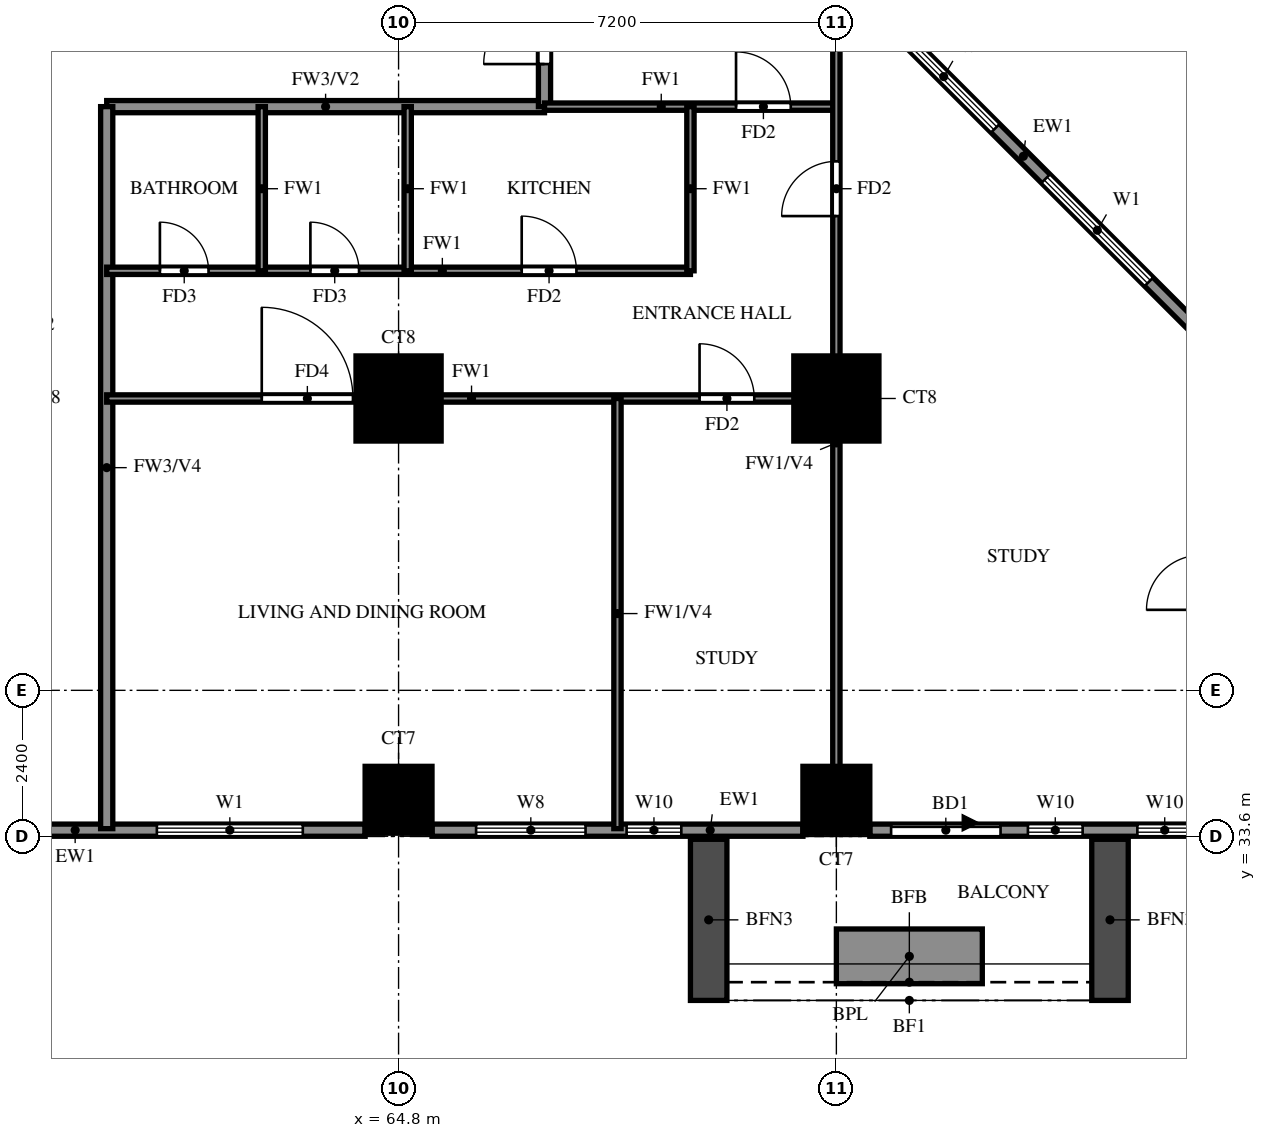
"""IFC4 building model, lengths in metres.
Left out: names, types, materials, properties, quantities, classifications, styles, units other than length and angle.
Written with IfcOpenShell. Run it as: python <this file> out.ifc"""

import sys

from ifc_helpers import new_model, si_unit, direction, frame, frame_2d, origin, origin_2d, place, context, subcontext, project, spatial, rectangle, extrude, source, transform, mapped, element, fill, save


model = new_model("IFC4")
c1 = context("Model", 3, precision=1e-05, world=origin(), true_north=direction((0.0, 1.0)))
c2 = subcontext(c1, "Body", "Model", "MODEL_VIEW")
j1 = project(units=[si_unit("LENGTHUNIT", "METRE"), si_unit("PLANEANGLEUNIT", "RADIAN")], contexts=[c1])
p1 = place(None, origin())
s1 = spatial("IfcSite", under=j1, at=p1, CompositionType="ELEMENT")
p2 = place(p1, origin())
s2 = spatial("IfcBuilding", under=s1, at=p2, CompositionType="ELEMENT")
p3 = place(p2, frame((0.0, 0.0, 51.5)))
s3 = spatial("IfcBuildingStorey", under=s2, at=p3, CompositionType="ELEMENT", Elevation=51.5)
m1 = source(origin(), c2, "Body", "SweptSolid", [
    extrude(rectangle(XDim=1.1, YDim=1.1, at=origin_2d()), origin(), (0.0, 0.0, 1.0), 3.18),
])
for number, where, z_axis, x_axis in (
    (1, (64.8, 34.2, 0.0), (0.0, 0.0, 1.0), (1.0, 0.0, 0.0)),
    (2, (72.0, 34.2, 0.0), (0.0, 0.0, 1.0), (1.0, 0.0, 0.0)),
):
    element("IfcColumn", number, at=place(p3, frame(where, z_axis=z_axis, x_axis=x_axis)), inside=s3, PredefinedType="COLUMN", context=c2, shape_type="MappedRepresentation", body=[
        mapped(m1, transform((0.0, 0.0, 0.0))),
    ])
m2 = source(origin(), c2, "Body", "SweptSolid", [
    extrude(rectangle(XDim=1.4, YDim=1.4, at=origin_2d()), origin(), (0.0, 0.0, 1.0), 3.18),
])
for number, where, z_axis, x_axis in (
    (3, (64.8, 40.8, 0.0), (0.0, 0.0, 1.0), (1.0, 0.0, 0.0)),
    (4, (72.0, 40.8, 0.0), (0.0, 0.0, 1.0), (1.0, 0.0, 0.0)),
):
    element("IfcColumn", number, at=place(p3, frame(where, z_axis=z_axis, x_axis=x_axis)), inside=s3, PredefinedType="COLUMN", context=c2, shape_type="MappedRepresentation", body=[
        mapped(m2, transform((0.0, 0.0, 0.0))),
    ])
p4 = place(p3, frame((78.74, 41.118, 0.0), z_axis=(0.0, 0.0, 1.0), x_axis=(-0.707106781187, 0.707106781187, 0.0)))
e5 = element("IfcWall", 5, at=p4, inside=s3, PredefinedType="SOLIDWALL", context=c2, shape_type="SweptSolid", body=[
    extrude(rectangle(XDim=9.874, YDim=0.2, at=frame_2d((4.937, 0.0))), origin(), (0.0, 0.0, 1.0), 3.18),
])
p5 = place(p4, frame((2.264, 0.0, 0.6)))
e6 = element("IfcOpeningElement", 6, at=p5, cuts=e5, PredefinedType="OPENING", context=c2, shape_type="SweptSolid", body=[
    extrude(rectangle(XDim=2.4, YDim=2.4, at=frame_2d((1.2, 1.2))), frame((0.0, 0.11, 0.0), z_axis=(0.0, -1.0, 0.0), x_axis=(1.0, 0.0, 0.0)), (0.0, 0.0, 1.0), 0.22),
])
p6 = place(p4, frame((5.836, 0.0, 0.6)))
e7 = element("IfcOpeningElement", 7, at=p6, cuts=e5, PredefinedType="OPENING", context=c2, shape_type="SweptSolid", body=[
    extrude(rectangle(XDim=2.4, YDim=2.4, at=frame_2d((1.2, 1.2))), frame((0.0, 0.11, 0.0), z_axis=(0.0, -1.0, 0.0), x_axis=(1.0, 0.0, 0.0)), (0.0, 0.0, 1.0), 0.22),
])
p7 = place(p3, frame((58.8, 33.7, 0.0), z_axis=(0.0, 0.0, 1.0), x_axis=(1.0, 0.0, 0.0)))
e8 = element("IfcWall", 8, at=p7, inside=s3, PredefinedType="SOLIDWALL", context=c2, shape_type="SweptSolid", body=[
    extrude(rectangle(XDim=5.45, YDim=0.2, at=frame_2d((2.725, 0.0))), origin(), (0.0, 0.0, 1.0), 3.18),
])
p8 = place(p7, frame((2.025, 0.0, 0.6)))
e9 = element("IfcOpeningElement", 9, at=p8, cuts=e8, PredefinedType="OPENING", context=c2, shape_type="SweptSolid", body=[
    extrude(rectangle(XDim=2.4, YDim=2.4, at=frame_2d((1.2, 1.2))), frame((0.0, 0.11, 0.0), z_axis=(0.0, -1.0, 0.0), x_axis=(1.0, 0.0, 0.0)), (0.0, 0.0, 1.0), 0.22),
])
p9 = place(p3, frame((65.35, 33.7, 0.0), z_axis=(0.0, 0.0, 1.0), x_axis=(1.0, 0.0, 0.0)))
e10 = element("IfcWall", 10, at=p9, inside=s3, PredefinedType="SOLIDWALL", context=c2, shape_type="SweptSolid", body=[
    extrude(rectangle(XDim=6.1, YDim=0.2, at=frame_2d((3.05, 0.0))), origin(), (0.0, 0.0, 1.0), 3.18),
])
p10 = place(p9, frame((3.2, 0.0, 0.6)))
e11 = element("IfcOpeningElement", 11, at=p10, cuts=e10, PredefinedType="OPENING", context=c2, shape_type="SweptSolid", body=[
    extrude(rectangle(XDim=0.9, YDim=2.4, at=frame_2d((0.45, 1.2))), frame((0.0, 0.11, 0.0), z_axis=(0.0, -1.0, 0.0), x_axis=(1.0, 0.0, 0.0)), (0.0, 0.0, 1.0), 0.22),
])
p11 = place(p9, frame((0.725, 0.0, 0.6)))
e12 = element("IfcOpeningElement", 12, at=p11, cuts=e10, PredefinedType="OPENING", context=c2, shape_type="SweptSolid", body=[
    extrude(rectangle(XDim=1.8, YDim=2.4, at=frame_2d((0.9, 1.2))), frame((0.0, 0.11, 0.0), z_axis=(0.0, -1.0, 0.0), x_axis=(1.0, 0.0, 0.0)), (0.0, 0.0, 1.0), 0.22),
])
p12 = place(p3, frame((72.55, 33.7, 0.0), z_axis=(0.0, 0.0, 1.0), x_axis=(1.0, 0.0, 0.0)))
e13 = element("IfcWall", 13, at=p12, inside=s3, PredefinedType="SOLIDWALL", context=c2, shape_type="SweptSolid", body=[
    extrude(rectangle(XDim=13.609, YDim=0.2, at=frame_2d((6.804, 0.0))), origin(), (0.0, 0.0, 1.0), 3.18),
])
p13 = place(p12, frame((0.35, 0.0, 0.0)))
e14 = element("IfcOpeningElement", 14, at=p13, cuts=e13, PredefinedType="OPENING", context=c2, shape_type="SweptSolid", body=[
    extrude(rectangle(XDim=1.8, YDim=2.4, at=frame_2d((0.9, 1.2))), frame((0.0, 0.11, 0.0), z_axis=(0.0, -1.0, 0.0), x_axis=(1.0, 0.0, 0.0)), (0.0, 0.0, 1.0), 0.22),
])
p14 = place(p12, frame((2.6, 0.0, 0.6)))
e15 = element("IfcOpeningElement", 15, at=p14, cuts=e13, PredefinedType="OPENING", context=c2, shape_type="SweptSolid", body=[
    extrude(rectangle(XDim=0.9, YDim=2.4, at=frame_2d((0.45, 1.2))), frame((0.0, 0.11, 0.0), z_axis=(0.0, -1.0, 0.0), x_axis=(1.0, 0.0, 0.0)), (0.0, 0.0, 1.0), 0.22),
])
p15 = place(p12, frame((4.4, 0.0, 0.6)))
e16 = element("IfcOpeningElement", 16, at=p15, cuts=e13, PredefinedType="OPENING", context=c2, shape_type="SweptSolid", body=[
    extrude(rectangle(XDim=0.9, YDim=2.4, at=frame_2d((0.45, 1.2))), frame((0.0, 0.11, 0.0), z_axis=(0.0, -1.0, 0.0), x_axis=(1.0, 0.0, 0.0)), (0.0, 0.0, 1.0), 0.22),
])
p16 = place(p12, frame((6.536, 0.0, 0.6)))
e17 = element("IfcOpeningElement", 17, at=p16, cuts=e13, PredefinedType="OPENING", context=c2, shape_type="SweptSolid", body=[
    extrude(rectangle(XDim=2.4, YDim=2.4, at=frame_2d((1.2, 1.2))), frame((0.0, 0.11, 0.0), z_axis=(0.0, -1.0, 0.0), x_axis=(1.0, 0.0, 0.0)), (0.0, 0.0, 1.0), 0.22),
])
p17 = place(p12, frame((9.922, 0.0, 0.6)))
e18 = element("IfcOpeningElement", 18, at=p17, cuts=e13, PredefinedType="OPENING", context=c2, shape_type="SweptSolid", body=[
    extrude(rectangle(XDim=2.4, YDim=2.4, at=frame_2d((1.2, 1.2))), frame((0.0, 0.11, 0.0), z_axis=(0.0, -1.0, 0.0), x_axis=(1.0, 0.0, 0.0)), (0.0, 0.0, 1.0), 0.22),
])
for number, where, z_axis, x_axis in (
    (19, (69.9, 33.55, 0.0), (0.0, 0.0, 1.0), (0.0, -1.0, 0.0)),
    (20, (76.5, 33.55, 0.0), (0.0, 0.0, 1.0), (0.0, -1.0, 0.0)),
):
    element("IfcWall", number, at=place(p3, frame(where, z_axis=z_axis, x_axis=x_axis)), inside=s3, PredefinedType="SOLIDWALL", context=c2, shape_type="SweptSolid", body=[
        extrude(rectangle(XDim=2.65, YDim=0.6, at=frame_2d((1.325, 0.0))), origin(), (0.0, 0.0, 1.0), 2.85),
    ])
p18 = place(p3, frame((72.0, 31.625, 0.0), z_axis=(0.0, 0.0, 1.0), x_axis=(1.0, 0.0, 0.0)))
e21 = element("IfcWall", 21, at=p18, inside=s3, PredefinedType="SOLIDWALL", context=c2, shape_type="SweptSolid", body=[
    extrude(rectangle(XDim=2.4, YDim=0.9, at=frame_2d((1.2, 0.0))), origin(), (0.0, 0.0, 1.0), 0.9),
])
p19 = place(p3, frame((60.0, 45.6, 0.0), z_axis=(0.0, 0.0, 1.0), x_axis=(1.0, 0.0, 0.0)))
e22 = element("IfcWall", 22, at=p19, inside=s3, PredefinedType="SOLIDWALL", context=c2, shape_type="SweptSolid", body=[
    extrude(rectangle(XDim=7.2, YDim=0.2, at=frame_2d((3.6, 0.0))), origin(), (0.0, 0.0, 1.0), 3.18),
])
p20 = place(p3, frame((60.0, 33.725, 0.0), z_axis=(0.0, 0.0, 1.0), x_axis=(0.0, 1.0, 0.0)))
e23 = element("IfcWall", 23, at=p20, inside=s3, PredefinedType="SOLIDWALL", context=c2, shape_type="SweptSolid", body=[
    extrude(rectangle(XDim=11.875, YDim=0.2, at=frame_2d((5.938, 0.0))), origin(), (0.0, 0.0, 1.0), 2.28),
])
p21 = place(p3, frame((67.2, 45.6, 0.0), z_axis=(0.0, 0.0, 1.0), x_axis=(0.0, 1.0, 0.0)))
e24 = element("IfcWall", 24, at=p21, inside=s3, PredefinedType="SOLIDWALL", context=c2, shape_type="SweptSolid", body=[
    extrude(rectangle(XDim=8.4, YDim=0.2, at=frame_2d((4.2, 0.0))), origin(), (0.0, 0.0, 1.0), 3.18),
])
p22 = place(p21, frame((0.7, 0.0, 0.0)))
e25 = element("IfcOpeningElement", 25, at=p22, cuts=e24, PredefinedType="OPENING", context=c2, shape_type="SweptSolid", body=[
    extrude(rectangle(XDim=1.0, YDim=2.1, at=frame_2d((0.5, 1.05))), frame((0.0, 0.11, 0.0), z_axis=(0.0, -1.0, 0.0), x_axis=(1.0, 0.0, 0.0)), (0.0, 0.0, 1.0), 0.22),
])
p23 = place(p3, frame((60.0, 40.8, 0.0), z_axis=(0.0, 0.0, 1.0), x_axis=(1.0, 0.0, 0.0)))
e26 = element("IfcWall", 26, at=p23, inside=s3, PredefinedType="PARTITIONING", context=c2, shape_type="SweptSolid", body=[
    extrude(rectangle(XDim=12.0, YDim=0.12, at=frame_2d((6.0, 0.0))), origin(), (0.0, 0.0, 1.0), 3.18),
])
p24 = place(p23, frame((9.75, 0.0, 0.0)))
e27 = element("IfcOpeningElement", 27, at=p24, cuts=e26, PredefinedType="OPENING", context=c2, shape_type="SweptSolid", body=[
    extrude(rectangle(XDim=0.9, YDim=2.1, at=frame_2d((0.45, 1.05))), frame((0.0, 0.07, 0.0), z_axis=(0.0, -1.0, 0.0), x_axis=(1.0, 0.0, 0.0)), (0.0, 0.0, 1.0), 0.14),
])
p25 = place(p23, frame((2.55, 0.0, 0.0)))
e28 = element("IfcOpeningElement", 28, at=p25, cuts=e26, PredefinedType="OPENING", context=c2, shape_type="SweptSolid", body=[
    extrude(rectangle(XDim=1.5, YDim=2.1, at=frame_2d((0.75, 1.05))), frame((0.0, 0.07, 0.0), z_axis=(0.0, -1.0, 0.0), x_axis=(1.0, 0.0, 0.0)), (0.0, 0.0, 1.0), 0.14),
])
p26 = place(p3, frame((60.0, 42.9, 0.0), z_axis=(0.0, 0.0, 1.0), x_axis=(1.0, 0.0, 0.0)))
e29 = element("IfcWall", 29, at=p26, inside=s3, PredefinedType="PARTITIONING", context=c2, shape_type="SweptSolid", body=[
    extrude(rectangle(XDim=9.6, YDim=0.12, at=frame_2d((4.8, 0.0))), origin(), (0.0, 0.0, 1.0), 3.18),
])
p27 = place(p26, frame((6.825, 0.0, 0.0)))
e30 = element("IfcOpeningElement", 30, at=p27, cuts=e29, PredefinedType="OPENING", context=c2, shape_type="SweptSolid", body=[
    extrude(rectangle(XDim=0.9, YDim=2.1, at=frame_2d((0.45, 1.05))), frame((0.0, 0.07, 0.0), z_axis=(0.0, -1.0, 0.0), x_axis=(1.0, 0.0, 0.0)), (0.0, 0.0, 1.0), 0.14),
])
p28 = place(p26, frame((3.35, 0.0, 0.0)))
e31 = element("IfcOpeningElement", 31, at=p28, cuts=e29, PredefinedType="OPENING", context=c2, shape_type="SweptSolid", body=[
    extrude(rectangle(XDim=0.8, YDim=2.1, at=frame_2d((0.4, 1.05))), frame((0.0, 0.07, 0.0), z_axis=(0.0, -1.0, 0.0), x_axis=(1.0, 0.0, 0.0)), (0.0, 0.0, 1.0), 0.14),
])
p29 = place(p26, frame((0.875, 0.0, 0.0)))
e32 = element("IfcOpeningElement", 32, at=p29, cuts=e29, PredefinedType="OPENING", context=c2, shape_type="SweptSolid", body=[
    extrude(rectangle(XDim=0.8, YDim=2.1, at=frame_2d((0.4, 1.05))), frame((0.0, 0.07, 0.0), z_axis=(0.0, -1.0, 0.0), x_axis=(1.0, 0.0, 0.0)), (0.0, 0.0, 1.0), 0.14),
])
p30 = place(p3, frame((67.2, 45.6, 0.0), z_axis=(0.0, 0.0, 1.0), x_axis=(1.0, 0.0, 0.0)))
e33 = element("IfcWall", 33, at=p30, inside=s3, PredefinedType="PARTITIONING", context=c2, shape_type="SweptSolid", body=[
    extrude(rectangle(XDim=4.8, YDim=0.12, at=frame_2d((2.4, 0.0))), origin(), (0.0, 0.0, 1.0), 3.18),
])
p31 = place(p30, frame((3.15, 0.0, 0.0)))
e34 = element("IfcOpeningElement", 34, at=p31, cuts=e33, PredefinedType="OPENING", context=c2, shape_type="SweptSolid", body=[
    extrude(rectangle(XDim=0.9, YDim=2.1, at=frame_2d((0.45, 1.05))), frame((0.0, 0.07, 0.0), z_axis=(0.0, -1.0, 0.0), x_axis=(1.0, 0.0, 0.0)), (0.0, 0.0, 1.0), 0.14),
])
for number, where, z_axis, x_axis in (
    (35, (62.55, 42.9, 0.0), (0.0, 0.0, 1.0), (0.0, 1.0, 0.0)),
    (36, (64.95, 42.9, 0.0), (0.0, 0.0, 1.0), (0.0, 1.0, 0.0)),
):
    element("IfcWall", number, at=place(p3, frame(where, z_axis=z_axis, x_axis=x_axis)), inside=s3, PredefinedType="PARTITIONING", context=c2, shape_type="SweptSolid", body=[
        extrude(rectangle(XDim=2.7, YDim=0.12, at=frame_2d((1.35, 0.0))), origin(), (0.0, 0.0, 1.0), 3.18),
    ])
p32 = place(p3, frame((68.4, 33.725, 0.0), z_axis=(0.0, 0.0, 1.0), x_axis=(0.0, 1.0, 0.0)))
e37 = element("IfcWall", 37, at=p32, inside=s3, PredefinedType="PARTITIONING", context=c2, shape_type="SweptSolid", body=[
    extrude(rectangle(XDim=7.075, YDim=0.12, at=frame_2d((3.538, 0.0))), origin(), (0.0, 0.0, 1.0), 2.28),
])
p33 = place(p3, frame((69.6, 42.9, 0.0), z_axis=(0.0, 0.0, 1.0), x_axis=(0.0, 1.0, 0.0)))
e38 = element("IfcWall", 38, at=p33, inside=s3, PredefinedType="PARTITIONING", context=c2, shape_type="SweptSolid", body=[
    extrude(rectangle(XDim=2.7, YDim=0.12, at=frame_2d((1.35, 0.0))), origin(), (0.0, 0.0, 1.0), 3.18),
])
p34 = place(p3, frame((72.0, 33.725, 0.0), z_axis=(0.0, 0.0, 1.0), x_axis=(0.0, 1.0, 0.0)))
e39 = element("IfcWall", 39, at=p34, inside=s3, PredefinedType="PARTITIONING", context=c2, shape_type="SweptSolid", body=[
    extrude(rectangle(XDim=14.098, YDim=0.12, at=frame_2d((7.049, 0.0))), origin(), (0.0, 0.0, 1.0), 2.28),
])
p35 = place(p34, frame((10.075, 0.0, 0.0)))
e40 = element("IfcOpeningElement", 40, at=p35, cuts=e39, PredefinedType="OPENING", context=c2, shape_type="SweptSolid", body=[
    extrude(rectangle(XDim=0.9, YDim=2.1, at=frame_2d((0.45, 1.05))), frame((0.0, 0.07, 0.0), z_axis=(0.0, -1.0, 0.0), x_axis=(1.0, 0.0, 0.0)), (0.0, 0.0, 1.0), 0.14),
])
p36 = place(p5, origin())
e41 = element("IfcWindow", 41, at=p36, inside=s3, PartitioningType="DOUBLE_PANEL_VERTICAL", PredefinedType="WINDOW", context=c2, shape_type="SweptSolid", body=[
    extrude(rectangle(XDim=2.4, YDim=2.4, at=frame_2d((1.2, 1.2))), frame((0.0, 0.03, 0.0), z_axis=(0.0, -1.0, 0.0), x_axis=(1.0, 0.0, 0.0)), (0.0, 0.0, 1.0), 0.06),
])
fill(e6, e41)
p37 = place(p6, origin())
e42 = element("IfcWindow", 42, at=p37, inside=s3, PartitioningType="DOUBLE_PANEL_VERTICAL", PredefinedType="WINDOW", context=c2, shape_type="SweptSolid", body=[
    extrude(rectangle(XDim=2.4, YDim=2.4, at=frame_2d((1.2, 1.2))), frame((0.0, 0.03, 0.0), z_axis=(0.0, -1.0, 0.0), x_axis=(1.0, 0.0, 0.0)), (0.0, 0.0, 1.0), 0.06),
])
fill(e7, e42)
p38 = place(p8, origin())
e43 = element("IfcWindow", 43, at=p38, inside=s3, PartitioningType="DOUBLE_PANEL_VERTICAL", PredefinedType="WINDOW", context=c2, shape_type="SweptSolid", body=[
    extrude(rectangle(XDim=2.4, YDim=2.4, at=frame_2d((1.2, 1.2))), frame((0.0, 0.03, 0.0), z_axis=(0.0, -1.0, 0.0), x_axis=(1.0, 0.0, 0.0)), (0.0, 0.0, 1.0), 0.06),
])
fill(e9, e43)
p39 = place(p10, origin())
e44 = element("IfcWindow", 44, at=p39, inside=s3, PartitioningType="SINGLE_PANEL", PredefinedType="WINDOW", context=c2, shape_type="SweptSolid", body=[
    extrude(rectangle(XDim=0.9, YDim=2.4, at=frame_2d((0.45, 1.2))), frame((0.0, 0.03, 0.0), z_axis=(0.0, -1.0, 0.0), x_axis=(1.0, 0.0, 0.0)), (0.0, 0.0, 1.0), 0.06),
])
fill(e11, e44)
p40 = place(p11, origin())
e45 = element("IfcWindow", 45, at=p40, inside=s3, PartitioningType="DOUBLE_PANEL_VERTICAL", PredefinedType="WINDOW", context=c2, shape_type="SweptSolid", body=[
    extrude(rectangle(XDim=1.8, YDim=2.4, at=frame_2d((0.9, 1.2))), frame((0.0, 0.03, 0.0), z_axis=(0.0, -1.0, 0.0), x_axis=(1.0, 0.0, 0.0)), (0.0, 0.0, 1.0), 0.06),
])
fill(e12, e45)
p41 = place(p13, origin())
e46 = element("IfcDoor", 46, at=p41, inside=s3, OperationType="DOUBLE_DOOR_SLIDING", PredefinedType="DOOR", context=c2, shape_type="SweptSolid", body=[
    extrude(rectangle(XDim=1.8, YDim=2.4, at=frame_2d((0.9, 1.2))), frame((0.0, 0.025, 0.0), z_axis=(0.0, -1.0, 0.0), x_axis=(1.0, 0.0, 0.0)), (0.0, 0.0, 1.0), 0.05),
])
fill(e14, e46)
p42 = place(p14, origin())
e47 = element("IfcWindow", 47, at=p42, inside=s3, PartitioningType="SINGLE_PANEL", PredefinedType="WINDOW", context=c2, shape_type="SweptSolid", body=[
    extrude(rectangle(XDim=0.9, YDim=2.4, at=frame_2d((0.45, 1.2))), frame((0.0, 0.03, 0.0), z_axis=(0.0, -1.0, 0.0), x_axis=(1.0, 0.0, 0.0)), (0.0, 0.0, 1.0), 0.06),
])
fill(e15, e47)
p43 = place(p15, origin())
e48 = element("IfcWindow", 48, at=p43, inside=s3, PartitioningType="SINGLE_PANEL", PredefinedType="WINDOW", context=c2, shape_type="SweptSolid", body=[
    extrude(rectangle(XDim=0.9, YDim=2.4, at=frame_2d((0.45, 1.2))), frame((0.0, 0.03, 0.0), z_axis=(0.0, -1.0, 0.0), x_axis=(1.0, 0.0, 0.0)), (0.0, 0.0, 1.0), 0.06),
])
fill(e16, e48)
p44 = place(p31, origin())
e49 = element("IfcDoor", 49, at=p44, inside=s3, OperationType="SINGLE_SWING_LEFT", PredefinedType="DOOR", context=c2, shape_type="SweptSolid", body=[
    extrude(rectangle(XDim=0.9, YDim=2.1, at=frame_2d((0.45, 1.05))), frame((0.0, 0.025, 0.0), z_axis=(0.0, -1.0, 0.0), x_axis=(1.0, 0.0, 0.0)), (0.0, 0.0, 1.0), 0.05),
])
fill(e34, e49)
p45 = place(p22, origin())
e50 = element("IfcDoor", 50, at=p45, inside=s3, OperationType="SINGLE_SWING_LEFT", PredefinedType="DOOR", context=c2, shape_type="SweptSolid", body=[
    extrude(rectangle(XDim=1.0, YDim=2.1, at=frame_2d((0.5, 1.05))), frame((0.0, 0.025, 0.0), z_axis=(0.0, -1.0, 0.0), x_axis=(1.0, 0.0, 0.0)), (0.0, 0.0, 1.0), 0.05),
])
fill(e25, e50)
p46 = place(p24, origin())
e51 = element("IfcDoor", 51, at=p46, inside=s3, OperationType="SINGLE_SWING_RIGHT", PredefinedType="DOOR", context=c2, shape_type="SweptSolid", body=[
    extrude(rectangle(XDim=0.9, YDim=2.1, at=frame_2d((0.45, 1.05))), frame((0.0, 0.025, 0.0), z_axis=(0.0, -1.0, 0.0), x_axis=(1.0, 0.0, 0.0)), (0.0, 0.0, 1.0), 0.05),
])
fill(e27, e51)
p47 = place(p25, origin())
e52 = element("IfcDoor", 52, at=p47, inside=s3, OperationType="SINGLE_SWING_RIGHT", PredefinedType="DOOR", context=c2, shape_type="SweptSolid", body=[
    extrude(rectangle(XDim=1.5, YDim=2.1, at=frame_2d((0.75, 1.05))), frame((0.0, 0.025, 0.0), z_axis=(0.0, -1.0, 0.0), x_axis=(1.0, 0.0, 0.0)), (0.0, 0.0, 1.0), 0.05),
])
fill(e28, e52)
p48 = place(p27, origin())
e53 = element("IfcDoor", 53, at=p48, inside=s3, OperationType="SINGLE_SWING_LEFT", PredefinedType="DOOR", context=c2, shape_type="SweptSolid", body=[
    extrude(rectangle(XDim=0.9, YDim=2.1, at=frame_2d((0.45, 1.05))), frame((0.0, 0.025, 0.0), z_axis=(0.0, -1.0, 0.0), x_axis=(1.0, 0.0, 0.0)), (0.0, 0.0, 1.0), 0.05),
])
fill(e30, e53)
p49 = place(p28, origin())
e54 = element("IfcDoor", 54, at=p49, inside=s3, OperationType="SINGLE_SWING_RIGHT", PredefinedType="DOOR", context=c2, shape_type="SweptSolid", body=[
    extrude(rectangle(XDim=0.8, YDim=2.1, at=frame_2d((0.4, 1.05))), frame((0.0, 0.025, 0.0), z_axis=(0.0, -1.0, 0.0), x_axis=(1.0, 0.0, 0.0)), (0.0, 0.0, 1.0), 0.05),
])
fill(e31, e54)
p50 = place(p29, origin())
e55 = element("IfcDoor", 55, at=p50, inside=s3, OperationType="SINGLE_SWING_LEFT", PredefinedType="DOOR", context=c2, shape_type="SweptSolid", body=[
    extrude(rectangle(XDim=0.8, YDim=2.1, at=frame_2d((0.4, 1.05))), frame((0.0, 0.025, 0.0), z_axis=(0.0, -1.0, 0.0), x_axis=(1.0, 0.0, 0.0)), (0.0, 0.0, 1.0), 0.05),
])
fill(e32, e55)
p51 = place(p35, origin())
e56 = element("IfcDoor", 56, at=p51, inside=s3, OperationType="SINGLE_SWING_LEFT", PredefinedType="DOOR", context=c2, shape_type="SweptSolid", body=[
    extrude(rectangle(XDim=0.9, YDim=2.1, at=frame_2d((0.45, 1.05))), frame((0.0, 0.025, 0.0), z_axis=(0.0, -1.0, 0.0), x_axis=(1.0, 0.0, 0.0)), (0.0, 0.0, 1.0), 0.05),
])
fill(e40, e56)
save(model, sys.argv[1])
